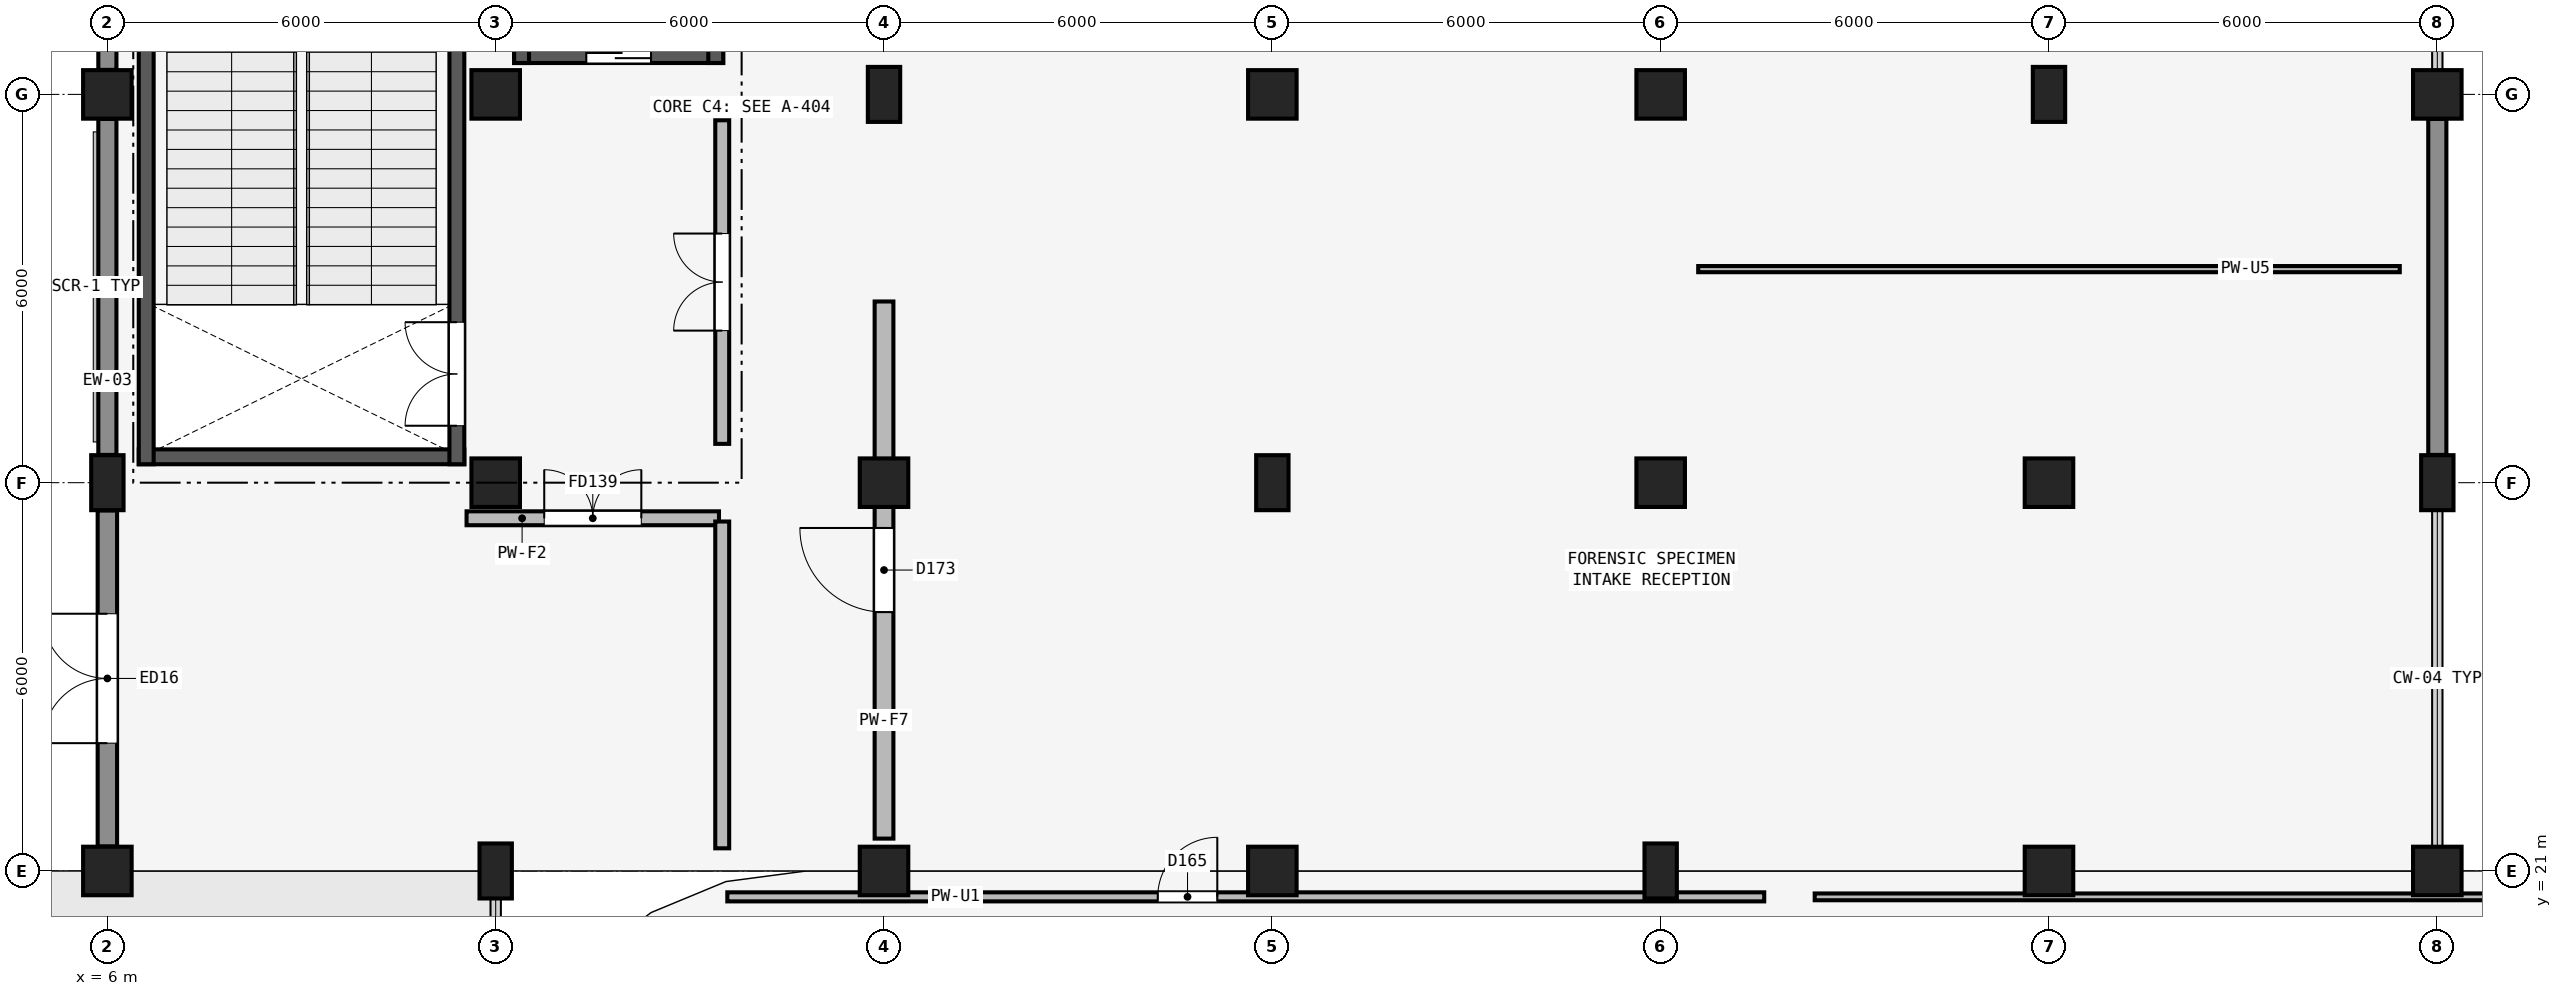
"""IFC4 building model, lengths in metres.
Left out: names, types, materials, properties, quantities, classifications, styles, units other than length and angle.
Written with IfcOpenShell. Run it as: python <this file> out.ifc"""

import sys

from ifc_helpers import new_model, si_unit, direction, frame, frame_2d, origin, origin_2d, place, context, subcontext, project, spatial, rectangle, extrude, element, fill, save


model = new_model("IFC4")
c1 = context("Model", 3, precision=1e-05, world=origin(), true_north=direction((0.0, 1.0)))
c2 = subcontext(c1, "Body", "Model", "MODEL_VIEW")
j1 = project(units=[si_unit("LENGTHUNIT", "METRE"), si_unit("PLANEANGLEUNIT", "RADIAN")], contexts=[c1])
p1 = place(None, origin())
s1 = spatial("IfcSite", under=j1, at=p1, CompositionType="ELEMENT")
p2 = place(p1, origin())
s2 = spatial("IfcBuilding", under=s1, at=p2, CompositionType="ELEMENT")
p3 = place(p2, origin())
s3 = spatial("IfcBuildingStorey", under=s2, at=p3, CompositionType="ELEMENT", Elevation=0.0)
p4 = place(p3, frame((6.0, 21.0, 0.0), z_axis=(0.0, 0.0, 1.0), x_axis=(1.0, 0.0, 0.0)))
e1 = element("IfcColumn", 1, at=p4, inside=s3, PredefinedType="COLUMN", context=c2, shape_type="SweptSolid", body=[
    extrude(rectangle(XDim=0.75, YDim=0.75, at=origin_2d()), origin(), (0.0, 0.0, 1.0), 4.8),
])
p5 = place(p3, frame((6.0, 27.0, 0.0), z_axis=(0.0, 0.0, 1.0), x_axis=(1.0, 0.0, 0.0)))
e2 = element("IfcColumn", 2, at=p5, inside=s3, PredefinedType="COLUMN", context=c2, shape_type="SweptSolid", body=[
    extrude(rectangle(XDim=0.5, YDim=0.85, at=origin_2d()), origin(), (0.0, 0.0, 1.0), 4.8),
])
p6 = place(p3, frame((6.0, 33.0, 0.0), z_axis=(0.0, 0.0, 1.0), x_axis=(1.0, 0.0, 0.0)))
e3 = element("IfcColumn", 3, at=p6, inside=s3, PredefinedType="COLUMN", context=c2, shape_type="SweptSolid", body=[
    extrude(rectangle(XDim=0.75, YDim=0.75, at=origin_2d()), origin(), (0.0, 0.0, 1.0), 4.8),
])
p7 = place(p3, frame((12.0, 21.0, 0.0), z_axis=(0.0, 0.0, 1.0), x_axis=(1.0, 0.0, 0.0)))
e4 = element("IfcColumn", 4, at=p7, inside=s3, PredefinedType="COLUMN", context=c2, shape_type="SweptSolid", body=[
    extrude(rectangle(XDim=0.5, YDim=0.85, at=origin_2d()), origin(), (0.0, 0.0, 1.0), 4.8),
])
for number, where, z_axis, x_axis in (
    (5, (12.0, 27.0, 0.0), (0.0, 0.0, 1.0), (1.0, 0.0, 0.0)),
    (6, (12.0, 33.0, 0.0), (0.0, 0.0, 1.0), (1.0, 0.0, 0.0)),
    (7, (18.0, 21.0, 0.0), (0.0, 0.0, 1.0), (1.0, 0.0, 0.0)),
    (8, (18.0, 27.0, 0.0), (0.0, 0.0, 1.0), (1.0, 0.0, 0.0)),
):
    element("IfcColumn", number, at=place(p3, frame(where, z_axis=z_axis, x_axis=x_axis)), inside=s3, PredefinedType="COLUMN", context=c2, shape_type="SweptSolid", body=[
        extrude(rectangle(XDim=0.75, YDim=0.75, at=origin_2d()), origin(), (0.0, 0.0, 1.0), 4.8),
    ])
p8 = place(p3, frame((18.0, 33.0, 0.0), z_axis=(0.0, 0.0, 1.0), x_axis=(1.0, 0.0, 0.0)))
e9 = element("IfcColumn", 9, at=p8, inside=s3, PredefinedType="COLUMN", context=c2, shape_type="SweptSolid", body=[
    extrude(rectangle(XDim=0.5, YDim=0.85, at=origin_2d()), origin(), (0.0, 0.0, 1.0), 4.8),
])
p9 = place(p3, frame((24.0, 21.0, 0.0), z_axis=(0.0, 0.0, 1.0), x_axis=(1.0, 0.0, 0.0)))
e10 = element("IfcColumn", 10, at=p9, inside=s3, PredefinedType="COLUMN", context=c2, shape_type="SweptSolid", body=[
    extrude(rectangle(XDim=0.75, YDim=0.75, at=origin_2d()), origin(), (0.0, 0.0, 1.0), 4.8),
])
p10 = place(p3, frame((24.0, 27.0, 0.0), z_axis=(0.0, 0.0, 1.0), x_axis=(1.0, 0.0, 0.0)))
e11 = element("IfcColumn", 11, at=p10, inside=s3, PredefinedType="COLUMN", context=c2, shape_type="SweptSolid", body=[
    extrude(rectangle(XDim=0.5, YDim=0.85, at=origin_2d()), origin(), (0.0, 0.0, 1.0), 4.8),
])
p11 = place(p3, frame((24.0, 33.0, 0.0), z_axis=(0.0, 0.0, 1.0), x_axis=(1.0, 0.0, 0.0)))
e12 = element("IfcColumn", 12, at=p11, inside=s3, PredefinedType="COLUMN", context=c2, shape_type="SweptSolid", body=[
    extrude(rectangle(XDim=0.75, YDim=0.75, at=origin_2d()), origin(), (0.0, 0.0, 1.0), 4.8),
])
p12 = place(p3, frame((30.0, 21.0, 0.0), z_axis=(0.0, 0.0, 1.0), x_axis=(1.0, 0.0, 0.0)))
e13 = element("IfcColumn", 13, at=p12, inside=s3, PredefinedType="COLUMN", context=c2, shape_type="SweptSolid", body=[
    extrude(rectangle(XDim=0.5, YDim=0.85, at=origin_2d()), origin(), (0.0, 0.0, 1.0), 4.8),
])
for number, where, z_axis, x_axis in (
    (14, (30.0, 27.0, 0.0), (0.0, 0.0, 1.0), (1.0, 0.0, 0.0)),
    (15, (30.0, 33.0, 0.0), (0.0, 0.0, 1.0), (1.0, 0.0, 0.0)),
    (16, (36.0, 21.0, 0.0), (0.0, 0.0, 1.0), (1.0, 0.0, 0.0)),
    (17, (36.0, 27.0, 0.0), (0.0, 0.0, 1.0), (1.0, 0.0, 0.0)),
):
    element("IfcColumn", number, at=place(p3, frame(where, z_axis=z_axis, x_axis=x_axis)), inside=s3, PredefinedType="COLUMN", context=c2, shape_type="SweptSolid", body=[
        extrude(rectangle(XDim=0.75, YDim=0.75, at=origin_2d()), origin(), (0.0, 0.0, 1.0), 4.8),
    ])
p13 = place(p3, frame((36.0, 33.0, 0.0), z_axis=(0.0, 0.0, 1.0), x_axis=(1.0, 0.0, 0.0)))
e18 = element("IfcColumn", 18, at=p13, inside=s3, PredefinedType="COLUMN", context=c2, shape_type="SweptSolid", body=[
    extrude(rectangle(XDim=0.5, YDim=0.85, at=origin_2d()), origin(), (0.0, 0.0, 1.0), 4.8),
])
p14 = place(p3, frame((42.0, 21.0, 0.0), z_axis=(0.0, 0.0, 1.0), x_axis=(1.0, 0.0, 0.0)))
e19 = element("IfcColumn", 19, at=p14, inside=s3, PredefinedType="COLUMN", context=c2, shape_type="SweptSolid", body=[
    extrude(rectangle(XDim=0.75, YDim=0.75, at=origin_2d()), origin(), (0.0, 0.0, 1.0), 4.8),
])
p15 = place(p3, frame((42.0, 27.0, 0.0), z_axis=(0.0, 0.0, 1.0), x_axis=(1.0, 0.0, 0.0)))
e20 = element("IfcColumn", 20, at=p15, inside=s3, PredefinedType="COLUMN", context=c2, shape_type="SweptSolid", body=[
    extrude(rectangle(XDim=0.5, YDim=0.85, at=origin_2d()), origin(), (0.0, 0.0, 1.0), 4.8),
])
p16 = place(p3, frame((42.0, 33.0, 0.0), z_axis=(0.0, 0.0, 1.0), x_axis=(1.0, 0.0, 0.0)))
e21 = element("IfcColumn", 21, at=p16, inside=s3, PredefinedType="COLUMN", context=c2, shape_type="SweptSolid", body=[
    extrude(rectangle(XDim=0.75, YDim=0.75, at=origin_2d()), origin(), (0.0, 0.0, 1.0), 4.8),
])
p17 = place(p3, frame((6.0, 21.379, 0.0), z_axis=(0.0, 0.0, 1.0), x_axis=(0.0, 1.0, 0.0)))
e22 = element("IfcWall", 22, at=p17, inside=s3, PredefinedType="SOLIDWALL", context=c2, shape_type="SweptSolid", body=[
    extrude(rectangle(XDim=5.192, YDim=0.3, at=frame_2d((2.596, 0.0))), origin(), (0.0, 0.0, 1.0), 3.49),
])
p18 = place(p17, frame((1.596, 0.0, 0.0)))
e23 = element("IfcOpeningElement", 23, at=p18, cuts=e22, PredefinedType="OPENING", context=c2, shape_type="SweptSolid", body=[
    extrude(rectangle(XDim=2.0, YDim=2.4, at=frame_2d((1.0, 1.2))), frame((0.0, 0.16, 0.0), z_axis=(0.0, -1.0, 0.0), x_axis=(1.0, 0.0, 0.0)), (0.0, 0.0, 1.0), 0.32),
])
for number, where, z_axis, x_axis in (
    (24, (6.0, 27.429, 0.0), (0.0, 0.0, 1.0), (0.0, 1.0, 0.0)),
    (25, (42.0, 27.429, 0.0), (0.0, 0.0, 1.0), (0.0, 1.0, 0.0)),
):
    element("IfcWall", number, at=place(p3, frame(where, z_axis=z_axis, x_axis=x_axis)), inside=s3, PredefinedType="SOLIDWALL", context=c2, shape_type="SweptSolid", body=[
        extrude(rectangle(XDim=5.192, YDim=0.28, at=frame_2d((2.596, 0.0))), origin(), (0.0, 0.0, 1.0), 3.99),
    ])
p19 = place(p3, frame((6.0, 33.379, 0.0), z_axis=(0.0, 0.0, 1.0), x_axis=(0.0, 1.0, 0.0)))
e26 = element("IfcWall", 26, at=p19, inside=s3, PredefinedType="SOLIDWALL", context=c2, shape_type="SweptSolid", body=[
    extrude(rectangle(XDim=5.242, YDim=0.28, at=frame_2d((2.621, 0.0))), origin(), (0.0, 0.0, 1.0), 4.04),
])
p20 = place(p19, frame((1.571, 0.0, 0.9)))
e27 = element("IfcOpeningElement", 27, at=p20, cuts=e26, PredefinedType="OPENING", context=c2, shape_type="SweptSolid", body=[
    extrude(rectangle(XDim=2.1, YDim=1.5, at=frame_2d((1.05, 0.75))), frame((0.0, 0.15, 0.0), z_axis=(0.0, -1.0, 0.0), x_axis=(1.0, 0.0, 0.0)), (0.0, 0.0, 1.0), 0.3),
])
p21 = place(p3, frame((6.485, 27.4, 0.0), z_axis=(0.0, 0.0, 1.0), x_axis=(1.0, 0.0, 0.0)))
e28 = element("IfcWall", 28, at=p21, inside=s3, PredefinedType="SHEAR", context=c2, shape_type="SweptSolid", body=[
    extrude(rectangle(XDim=5.03, YDim=0.23, at=frame_2d((2.515, 0.0))), origin(), (0.0, 0.0, 1.0), 4.66),
])
p22 = place(p3, frame((11.4, 27.285, 0.0), z_axis=(0.0, 0.0, 1.0), x_axis=(0.0, 1.0, 0.0)))
e29 = element("IfcWall", 29, at=p22, inside=s3, PredefinedType="SHEAR", context=c2, shape_type="SweptSolid", body=[
    extrude(rectangle(XDim=9.63, YDim=0.23, at=frame_2d((4.815, 0.0))), origin(), (0.0, 0.0, 1.0), 4.66),
])
p23 = place(p22, frame((0.595, 0.0, 0.0)))
e30 = element("IfcOpeningElement", 30, at=p23, cuts=e29, PredefinedType="OPENING", context=c2, shape_type="SweptSolid", body=[
    extrude(rectangle(XDim=1.6, YDim=2.2, at=frame_2d((0.8, 1.1))), frame((0.0, 0.125, 0.0), z_axis=(0.0, -1.0, 0.0), x_axis=(1.0, 0.0, 0.0)), (0.0, 0.0, 1.0), 0.25),
])
p24 = place(p3, frame((6.6, 36.915, 0.0), z_axis=(0.0, 0.0, 1.0), x_axis=(0.0, -1.0, 0.0)))
e31 = element("IfcWall", 31, at=p24, inside=s3, PredefinedType="SHEAR", context=c2, shape_type="SweptSolid", body=[
    extrude(rectangle(XDim=9.63, YDim=0.23, at=frame_2d((4.815, 0.0))), origin(), (0.0, 0.0, 1.0), 4.66),
])
p25 = place(p3, frame((15.5, 27.6, 0.0), z_axis=(0.0, 0.0, 1.0), x_axis=(0.0, 1.0, 0.0)))
e32 = element("IfcWall", 32, at=p25, inside=s3, PredefinedType="PARTITIONING", context=c2, shape_type="SweptSolid", body=[
    extrude(rectangle(XDim=5.0, YDim=0.215, at=frame_2d((2.5, 0.0))), origin(), (0.0, 0.0, 1.0), 4.49),
])
p26 = place(p25, frame((1.75, 0.0, 0.0)))
e33 = element("IfcOpeningElement", 33, at=p26, cuts=e32, PredefinedType="OPENING", context=c2, shape_type="SweptSolid", body=[
    extrude(rectangle(XDim=1.5, YDim=2.15, at=frame_2d((0.75, 1.075))), frame((0.0, 0.117, 0.0), z_axis=(0.0, -1.0, 0.0), x_axis=(1.0, 0.0, 0.0)), (0.0, 0.0, 1.0), 0.235),
])
p27 = place(p3, frame((12.285, 33.6, 0.0), z_axis=(0.0, 0.0, 1.0), x_axis=(1.0, 0.0, 0.0)))
e34 = element("IfcWall", 34, at=p27, inside=s3, PredefinedType="SHEAR", context=c2, shape_type="SweptSolid", body=[
    extrude(rectangle(XDim=3.23, YDim=0.23, at=frame_2d((1.615, 0.0))), origin(), (0.0, 0.0, 1.0), 4.8),
])
p28 = place(p27, frame((1.115, 0.0, 0.0)))
e35 = element("IfcOpeningElement", 35, at=p28, cuts=e34, PredefinedType="OPENING", context=c2, shape_type="SweptSolid", body=[
    extrude(rectangle(XDim=1.0, YDim=2.15, at=frame_2d((0.5, 1.075))), frame((0.0, 0.125, 0.0), z_axis=(0.0, -1.0, 0.0), x_axis=(1.0, 0.0, 0.0)), (0.0, 0.0, 1.0), 0.25),
])
for number, where, z_axis, x_axis in (
    (36, (15.4, 33.485, 0.0), (0.0, 0.0, 1.0), (0.0, 1.0, 0.0)),
    (37, (12.4, 37.115, 0.0), (0.0, 0.0, 1.0), (0.0, -1.0, 0.0)),
):
    element("IfcWall", number, at=place(p3, frame(where, z_axis=z_axis, x_axis=x_axis)), inside=s3, PredefinedType="SHEAR", context=c2, shape_type="SweptSolid", body=[
        extrude(rectangle(XDim=3.63, YDim=0.23, at=frame_2d((1.815, 0.0))), origin(), (0.0, 0.0, 1.0), 4.8),
    ])
p29 = place(p3, frame((11.55, 26.45, 0.0), z_axis=(0.0, 0.0, 1.0), x_axis=(1.0, 0.0, 0.0)))
e38 = element("IfcWall", 38, at=p29, inside=s3, PredefinedType="PARTITIONING", context=c2, shape_type="SweptSolid", body=[
    extrude(rectangle(XDim=3.9, YDim=0.215, at=frame_2d((1.95, 0.0))), origin(), (0.0, 0.0, 1.0), 4.09),
])
p30 = place(p29, frame((1.2, 0.0, 0.0)))
e39 = element("IfcOpeningElement", 39, at=p30, cuts=e38, PredefinedType="OPENING", context=c2, shape_type="SweptSolid", body=[
    extrude(rectangle(XDim=1.5, YDim=2.15, at=frame_2d((0.75, 1.075))), frame((0.0, 0.117, 0.0), z_axis=(0.0, -1.0, 0.0), x_axis=(1.0, 0.0, 0.0)), (0.0, 0.0, 1.0), 0.235),
])
p31 = place(p3, frame((15.5, 21.35, 0.0), z_axis=(0.0, 0.0, 1.0), x_axis=(0.0, 1.0, 0.0)))
e40 = element("IfcWall", 40, at=p31, inside=s3, PredefinedType="PARTITIONING", context=c2, shape_type="SweptSolid", body=[
    extrude(rectangle(XDim=5.05, YDim=0.215, at=frame_2d((2.525, 0.0))), origin(), (0.0, 0.0, 1.0), 3.49),
])
p32 = place(p3, frame((15.579, 20.6, 0.0), z_axis=(0.0, 0.0, 1.0), x_axis=(1.0, 0.0, 0.0)))
e41 = element("IfcWall", 41, at=p32, inside=s3, PredefinedType="PARTITIONING", context=c2, shape_type="SweptSolid", body=[
    extrude(rectangle(XDim=16.021, YDim=0.14, at=frame_2d((8.011, 0.0))), origin(), (0.0, 0.0, 1.0), 4.083),
])
p33 = place(p32, frame((6.65, 0.0, 0.0)))
e42 = element("IfcOpeningElement", 42, at=p33, cuts=e41, PredefinedType="OPENING", context=c2, shape_type="SweptSolid", body=[
    extrude(rectangle(XDim=0.92, YDim=2.1, at=frame_2d((0.46, 1.05))), frame((0.0, 0.08, 0.0), z_axis=(0.0, -1.0, 0.0), x_axis=(1.0, 0.0, 0.0)), (0.0, 0.0, 1.0), 0.16),
])
p34 = place(p3, frame((18.0, 21.5, 0.0), z_axis=(0.0, 0.0, 1.0), x_axis=(0.0, 1.0, 0.0)))
e43 = element("IfcWall", 43, at=p34, inside=s3, PredefinedType="PARTITIONING", context=c2, shape_type="SweptSolid", body=[
    extrude(rectangle(XDim=8.3, YDim=0.29, at=frame_2d((4.15, 0.0))), origin(), (0.0, 0.0, 1.0), 3.94),
])
p35 = place(p34, frame((3.5, 0.0, 0.0)))
e44 = element("IfcOpeningElement", 44, at=p35, cuts=e43, PredefinedType="OPENING", context=c2, shape_type="SweptSolid", body=[
    extrude(rectangle(XDim=1.3, YDim=2.2, at=frame_2d((0.65, 1.1))), frame((0.0, 0.155, 0.0), z_axis=(0.0, -1.0, 0.0), x_axis=(1.0, 0.0, 0.0)), (0.0, 0.0, 1.0), 0.31),
])
p36 = place(p3, frame((32.38, 20.6, 0.0), z_axis=(0.0, 0.0, 1.0), x_axis=(1.0, 0.0, 0.0)))
e45 = element("IfcWall", 45, at=p36, inside=s3, PredefinedType="PARTITIONING", context=c2, shape_type="SweptSolid", body=[
    extrude(rectangle(XDim=10.59, YDim=0.105, at=frame_2d((5.295, 0.0))), origin(), (0.0, 0.0, 1.0), 4.083),
])
p37 = place(p3, frame((41.42, 30.3, 0.0), z_axis=(0.0, 0.0, 1.0), x_axis=(-1.0, 0.0, 0.0)))
e46 = element("IfcWall", 46, at=p37, inside=s3, PredefinedType="PARTITIONING", context=c2, shape_type="SweptSolid", body=[
    extrude(rectangle(XDim=10.84, YDim=0.095, at=frame_2d((5.42, 0.0))), origin(), (0.0, 0.0, 1.0), 3.99),
])
p38 = place(p18, origin())
e47 = element("IfcDoor", 47, at=p38, inside=s3, OperationType="DOUBLE_DOOR_SINGLE_SWING", PredefinedType="DOOR", context=c2, shape_type="SweptSolid", body=[
    extrude(rectangle(XDim=2.0, YDim=2.4, at=frame_2d((1.0, 1.2))), frame((0.0, 0.025, 0.0), z_axis=(0.0, -1.0, 0.0), x_axis=(1.0, 0.0, 0.0)), (0.0, 0.0, 1.0), 0.05),
])
fill(e23, e47)
p39 = place(p23, origin())
e48 = element("IfcDoor", 48, at=p39, inside=s3, OperationType="DOUBLE_DOOR_SINGLE_SWING", PredefinedType="DOOR", context=c2, shape_type="SweptSolid", body=[
    extrude(rectangle(XDim=1.6, YDim=2.2, at=frame_2d((0.8, 1.1))), frame((0.0, 0.025, 0.0), z_axis=(0.0, -1.0, 0.0), x_axis=(1.0, 0.0, 0.0)), (0.0, 0.0, 1.0), 0.05),
])
fill(e30, e48)
p40 = place(p26, origin())
e49 = element("IfcDoor", 49, at=p40, inside=s3, OperationType="DOUBLE_DOOR_SINGLE_SWING", PredefinedType="DOOR", context=c2, shape_type="SweptSolid", body=[
    extrude(rectangle(XDim=1.5, YDim=2.15, at=frame_2d((0.75, 1.075))), frame((0.0, 0.025, 0.0), z_axis=(0.0, -1.0, 0.0), x_axis=(1.0, 0.0, 0.0)), (0.0, 0.0, 1.0), 0.05),
])
fill(e33, e49)
p41 = place(p28, origin())
e50 = element("IfcDoor", 50, at=p41, inside=s3, OperationType="SLIDING_TO_LEFT", PredefinedType="DOOR", context=c2, shape_type="SweptSolid", body=[
    extrude(rectangle(XDim=1.0, YDim=2.15, at=frame_2d((0.5, 1.075))), frame((0.0, 0.025, 0.0), z_axis=(0.0, -1.0, 0.0), x_axis=(1.0, 0.0, 0.0)), (0.0, 0.0, 1.0), 0.05),
])
fill(e35, e50)
p42 = place(p30, origin())
e51 = element("IfcDoor", 51, at=p42, inside=s3, OperationType="DOUBLE_DOOR_SINGLE_SWING", PredefinedType="DOOR", context=c2, shape_type="SweptSolid", body=[
    extrude(rectangle(XDim=1.5, YDim=2.15, at=frame_2d((0.75, 1.075))), frame((0.0, 0.025, 0.0), z_axis=(0.0, -1.0, 0.0), x_axis=(1.0, 0.0, 0.0)), (0.0, 0.0, 1.0), 0.05),
])
fill(e39, e51)
p43 = place(p33, origin())
e52 = element("IfcDoor", 52, at=p43, inside=s3, OperationType="SINGLE_SWING_RIGHT", PredefinedType="DOOR", context=c2, shape_type="SweptSolid", body=[
    extrude(rectangle(XDim=0.92, YDim=2.1, at=frame_2d((0.46, 1.05))), frame((0.0, 0.025, 0.0), z_axis=(0.0, -1.0, 0.0), x_axis=(1.0, 0.0, 0.0)), (0.0, 0.0, 1.0), 0.05),
])
fill(e42, e52)
p44 = place(p35, origin())
e53 = element("IfcDoor", 53, at=p44, inside=s3, OperationType="SINGLE_SWING_RIGHT", PredefinedType="DOOR", context=c2, shape_type="SweptSolid", body=[
    extrude(rectangle(XDim=1.3, YDim=2.2, at=frame_2d((0.65, 1.1))), frame((0.0, 0.025, 0.0), z_axis=(0.0, -1.0, 0.0), x_axis=(1.0, 0.0, 0.0)), (0.0, 0.0, 1.0), 0.05),
])
fill(e44, e53)
save(model, sys.argv[1])
